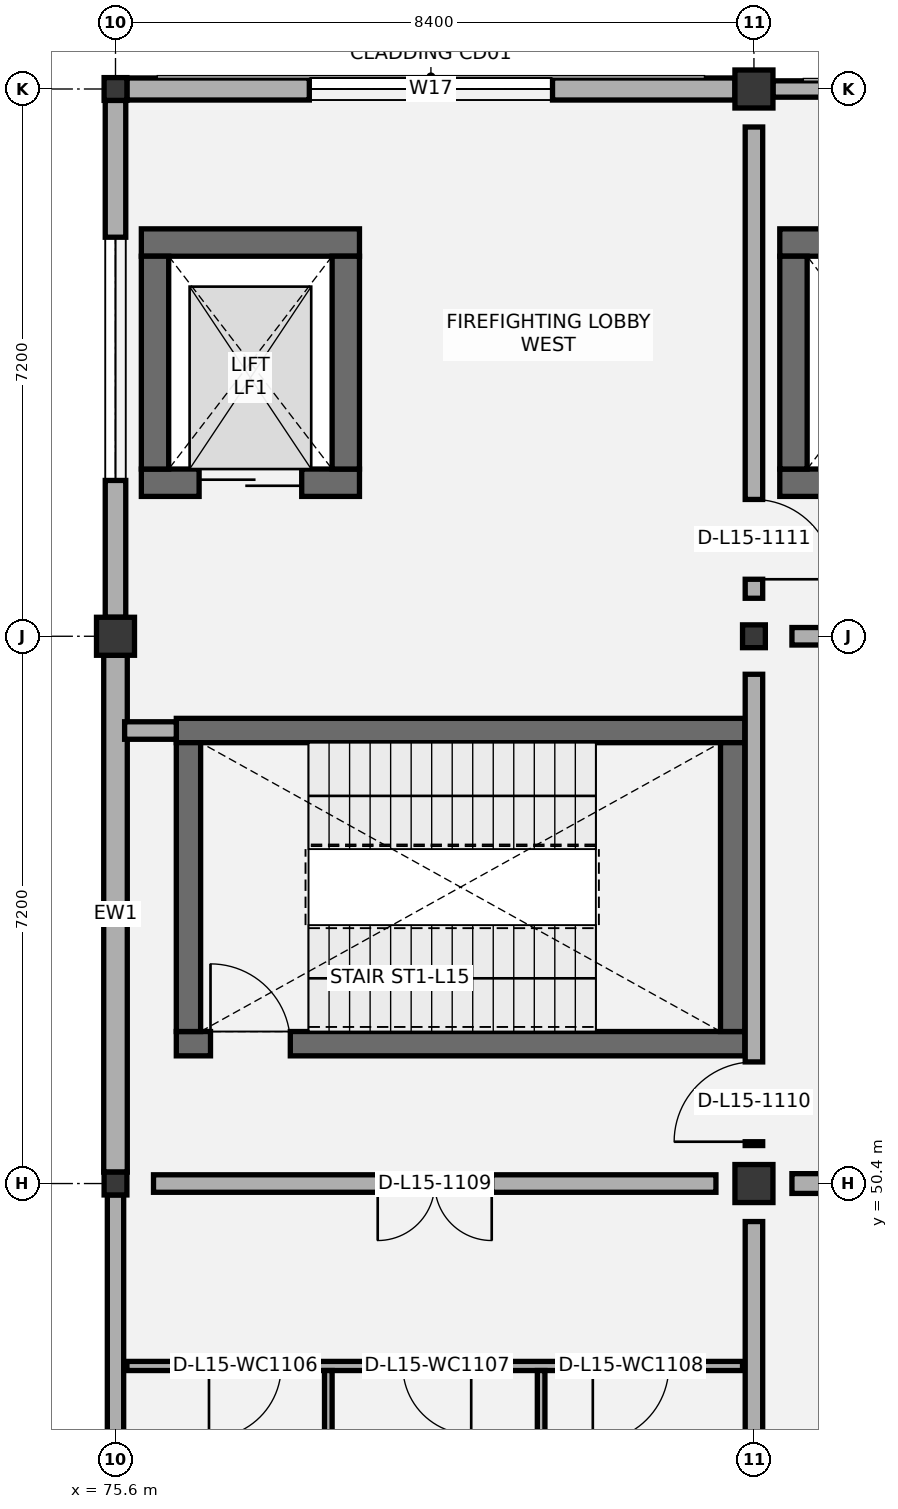
"""IFC4 building model, lengths in metres.
Left out: names, types, materials, properties, quantities, classifications, styles, units other than length and angle.
Written with IfcOpenShell. Run it as: python <this file> out.ifc"""

import sys

from ifc_helpers import new_model, si_unit, direction, frame, frame_2d, origin, origin_2d, place, context, subcontext, project, spatial, rectangle, i_section, extrude, element, fill, save


model = new_model("IFC4")
c1 = context("Model", 3, precision=1e-05, world=origin(), true_north=direction((0.0, 1.0)))
c2 = subcontext(c1, "Body", "Model", "MODEL_VIEW")
j1 = project(units=[si_unit("LENGTHUNIT", "METRE"), si_unit("PLANEANGLEUNIT", "RADIAN")], contexts=[c1])
p1 = place(None, origin())
s1 = spatial("IfcSite", under=j1, at=p1, CompositionType="ELEMENT")
p2 = place(p1, origin())
s2 = spatial("IfcBuilding", under=s1, at=p2, CompositionType="ELEMENT")
p3 = place(p2, frame((0.0, 0.0, 69.0)))
s3 = spatial("IfcBuildingStorey", under=s2, at=p3, CompositionType="ELEMENT", Elevation=69.0)
p4 = place(p3, frame((75.6, 50.4, 0.0), z_axis=(0.0, 0.0, 1.0), x_axis=(1.0, 0.0, 0.0)))
e1 = element("IfcColumn", 1, at=p4, inside=s3, PredefinedType="COLUMN", context=c2, shape_type="SweptSolid", body=[
    extrude(i_section(OverallWidth=0.3, OverallDepth=0.3, WebThickness=0.011, FlangeThickness=0.019, FilletRadius=0.027, at=origin_2d()), origin(), (0.0, 0.0, 1.0), 4.8),
])
p5 = place(p3, frame((75.6, 57.6, 0.0), z_axis=(0.0, 0.0, 1.0), x_axis=(1.0, 0.0, 0.0)))
e2 = element("IfcColumn", 2, at=p5, inside=s3, PredefinedType="COLUMN", context=c2, shape_type="SweptSolid", body=[
    extrude(rectangle(XDim=0.5, YDim=0.5, at=origin_2d()), origin(), (0.0, 0.0, 1.0), 4.8),
])
p6 = place(p3, frame((75.6, 64.8, 0.0), z_axis=(0.0, 0.0, 1.0), x_axis=(1.0, 0.0, 0.0)))
e3 = element("IfcColumn", 3, at=p6, inside=s3, PredefinedType="COLUMN", context=c2, shape_type="SweptSolid", body=[
    extrude(i_section(OverallWidth=0.3, OverallDepth=0.3, WebThickness=0.011, FlangeThickness=0.019, FilletRadius=0.027, at=origin_2d()), origin(), (0.0, 0.0, 1.0), 4.8),
])
p7 = place(p3, frame((84.0, 50.4, 0.0), z_axis=(0.0, 0.0, 1.0), x_axis=(1.0, 0.0, 0.0)))
e4 = element("IfcColumn", 4, at=p7, inside=s3, PredefinedType="COLUMN", context=c2, shape_type="SweptSolid", body=[
    extrude(rectangle(XDim=0.5, YDim=0.5, at=origin_2d()), origin(), (0.0, 0.0, 1.0), 4.8),
])
p8 = place(p3, frame((84.0, 57.6, 0.0), z_axis=(0.0, 0.0, 1.0), x_axis=(1.0, 0.0, 0.0)))
e5 = element("IfcColumn", 5, at=p8, inside=s3, PredefinedType="COLUMN", context=c2, shape_type="SweptSolid", body=[
    extrude(i_section(OverallWidth=0.3, OverallDepth=0.3, WebThickness=0.011, FlangeThickness=0.019, FilletRadius=0.027, at=origin_2d()), origin(), (0.0, 0.0, 1.0), 4.8),
])
p9 = place(p3, frame((84.0, 64.8, 0.0), z_axis=(0.0, 0.0, 1.0), x_axis=(1.0, 0.0, 0.0)))
e6 = element("IfcColumn", 6, at=p9, inside=s3, PredefinedType="COLUMN", context=c2, shape_type="SweptSolid", body=[
    extrude(rectangle(XDim=0.5, YDim=0.5, at=origin_2d()), origin(), (0.0, 0.0, 1.0), 4.8),
])
p10 = place(p3, frame((76.4, 52.24, 0.0), z_axis=(0.0, 0.0, 1.0), x_axis=(1.0, 0.0, 0.0)))
e7 = element("IfcWall", 7, at=p10, inside=s3, PredefinedType="SHEAR", context=c2, shape_type="SweptSolid", body=[
    extrude(rectangle(XDim=7.48, YDim=0.32, at=frame_2d((3.74, 0.0))), origin(), (0.0, 0.0, 1.0), 4.6),
])
p11 = place(p10, frame((0.45, 0.0, 0.0)))
e8 = element("IfcOpeningElement", 8, at=p11, cuts=e7, PredefinedType="OPENING", context=c2, shape_type="SweptSolid", body=[
    extrude(rectangle(XDim=1.05, YDim=2.15, at=frame_2d((0.525, 1.075))), frame((0.0, 0.17, 0.0), z_axis=(0.0, -1.0, 0.0), x_axis=(1.0, 0.0, 0.0)), (0.0, 0.0, 1.0), 0.34),
])
p12 = place(p3, frame((76.4, 56.36, 0.0), z_axis=(0.0, 0.0, 1.0), x_axis=(1.0, 0.0, 0.0)))
e9 = element("IfcWall", 9, at=p12, inside=s3, PredefinedType="SHEAR", context=c2, shape_type="SweptSolid", body=[
    extrude(rectangle(XDim=7.48, YDim=0.32, at=frame_2d((3.74, 0.0))), origin(), (0.0, 0.0, 1.0), 4.6),
])
for number, where, z_axis, x_axis in (
    (10, (76.56, 52.4, 0.0), (0.0, 0.0, 1.0), (0.0, 1.0, 0.0)),
    (11, (83.72, 52.4, 0.0), (0.0, 0.0, 1.0), (0.0, 1.0, 0.0)),
):
    element("IfcWall", number, at=place(p3, frame(where, z_axis=z_axis, x_axis=x_axis)), inside=s3, PredefinedType="SHEAR", context=c2, shape_type="SweptSolid", body=[
        extrude(rectangle(XDim=3.8, YDim=0.32, at=frame_2d((1.9, 0.0))), origin(), (0.0, 0.0, 1.0), 4.6),
    ])
p13 = place(p3, frame((75.94, 62.78, 0.0), z_axis=(0.0, 0.0, 1.0), x_axis=(1.0, 0.0, 0.0)))
e12 = element("IfcWall", 12, at=p13, inside=s3, PredefinedType="SHEAR", context=c2, shape_type="SweptSolid", body=[
    extrude(rectangle(XDim=2.87, YDim=0.36, at=frame_2d((1.435, 0.0))), origin(), (0.0, 0.0, 1.0), 5.9),
])
p14 = place(p3, frame((75.94, 59.62, 0.0), z_axis=(0.0, 0.0, 1.0), x_axis=(1.0, 0.0, 0.0)))
e13 = element("IfcWall", 13, at=p14, inside=s3, PredefinedType="SHEAR", context=c2, shape_type="SweptSolid", body=[
    extrude(rectangle(XDim=2.87, YDim=0.36, at=frame_2d((1.435, 0.0))), origin(), (0.0, 0.0, 1.0), 5.9),
])
p15 = place(p14, frame((0.76, 0.0, 0.0)))
e14 = element("IfcOpeningElement", 14, at=p15, cuts=e13, PredefinedType="OPENING", context=c2, shape_type="SweptSolid", body=[
    extrude(rectangle(XDim=1.35, YDim=2.2, at=frame_2d((0.675, 1.1))), frame((0.0, 0.19, 0.0), z_axis=(0.0, -1.0, 0.0), x_axis=(1.0, 0.0, 0.0)), (0.0, 0.0, 1.0), 0.38),
])
for number, where, z_axis, x_axis in (
    (15, (76.12, 59.8, 0.0), (0.0, 0.0, 1.0), (0.0, 1.0, 0.0)),
    (16, (78.63, 59.8, 0.0), (0.0, 0.0, 1.0), (0.0, 1.0, 0.0)),
):
    element("IfcWall", number, at=place(p3, frame(where, z_axis=z_axis, x_axis=x_axis)), inside=s3, PredefinedType="SHEAR", context=c2, shape_type="SweptSolid", body=[
        extrude(rectangle(XDim=2.8, YDim=0.36, at=frame_2d((1.4, 0.0))), origin(), (0.0, 0.0, 1.0), 5.9),
    ])
p16 = place(p3, frame((84.34, 62.78, 0.0), z_axis=(0.0, 0.0, 1.0), x_axis=(1.0, 0.0, 0.0)))
e17 = element("IfcWall", 17, at=p16, inside=s3, PredefinedType="SHEAR", context=c2, shape_type="SweptSolid", body=[
    extrude(rectangle(XDim=7.77, YDim=0.36, at=frame_2d((3.885, 0.0))), origin(), (0.0, 0.0, 1.0), 5.9),
])
p17 = place(p3, frame((84.34, 59.62, 0.0), z_axis=(0.0, 0.0, 1.0), x_axis=(1.0, 0.0, 0.0)))
e18 = element("IfcWall", 18, at=p17, inside=s3, PredefinedType="SHEAR", context=c2, shape_type="SweptSolid", body=[
    extrude(rectangle(XDim=2.66, YDim=0.36, at=frame_2d((1.33, 0.0))), origin(), (0.0, 0.0, 1.0), 5.9),
])
p18 = place(p17, frame((0.78, 0.0, 0.0)))
e19 = element("IfcOpeningElement", 19, at=p18, cuts=e18, PredefinedType="OPENING", context=c2, shape_type="SweptSolid", body=[
    extrude(rectangle(XDim=1.1, YDim=2.15, at=frame_2d((0.55, 1.075))), frame((0.0, 0.19, 0.0), z_axis=(0.0, -1.0, 0.0), x_axis=(1.0, 0.0, 0.0)), (0.0, 0.0, 1.0), 0.38),
])
p19 = place(p3, frame((84.52, 59.8, 0.0), z_axis=(0.0, 0.0, 1.0), x_axis=(0.0, 1.0, 0.0)))
e20 = element("IfcWall", 20, at=p19, inside=s3, PredefinedType="SHEAR", context=c2, shape_type="SweptSolid", body=[
    extrude(rectangle(XDim=2.8, YDim=0.36, at=frame_2d((1.4, 0.0))), origin(), (0.0, 0.0, 1.0), 5.9),
])
p20 = place(p3, frame((75.6, 43.45, 0.0), z_axis=(0.0, 0.0, 1.0), x_axis=(0.0, 1.0, 0.0)))
e21 = element("IfcWall", 21, at=p20, inside=s3, PredefinedType="SOLIDWALL", context=c2, shape_type="SweptSolid", body=[
    extrude(rectangle(XDim=6.8, YDim=0.215, at=frame_2d((3.4, 0.0))), origin(), (0.0, 0.0, 1.0), 4.045),
])
p21 = place(p3, frame((75.6, 50.55, 0.0), z_axis=(0.0, 0.0, 1.0), x_axis=(0.0, 1.0, 0.0)))
e22 = element("IfcWall", 22, at=p21, inside=s3, PredefinedType="SOLIDWALL", context=c2, shape_type="SweptSolid", body=[
    extrude(rectangle(XDim=6.8, YDim=0.31, at=frame_2d((3.4, 0.0))), origin(), (0.0, 0.0, 1.0), 4.045),
])
p22 = place(p3, frame((75.75, 64.8, 0.0), z_axis=(0.0, 0.0, 1.0), x_axis=(1.0, 0.0, 0.0)))
e23 = element("IfcWall", 23, at=p22, inside=s3, PredefinedType="SOLIDWALL", context=c2, shape_type="SweptSolid", body=[
    extrude(rectangle(XDim=8.0, YDim=0.29, at=frame_2d((4.0, 0.0))), origin(), (0.0, 0.0, 1.0), 4.365),
])
p23 = place(p22, frame((2.4, 0.0, 1.45)))
e24 = element("IfcOpeningElement", 24, at=p23, cuts=e23, PredefinedType="OPENING", context=c2, shape_type="SweptSolid", body=[
    extrude(rectangle(XDim=3.2, YDim=1.2, at=frame_2d((1.6, 0.6))), frame((0.0, 0.155, 0.0), z_axis=(0.0, -1.0, 0.0), x_axis=(1.0, 0.0, 0.0)), (0.0, 0.0, 1.0), 0.31),
])
p24 = place(p3, frame((75.6, 57.85, 0.0), z_axis=(0.0, 0.0, 1.0), x_axis=(0.0, 1.0, 0.0)))
e25 = element("IfcWall", 25, at=p24, inside=s3, PredefinedType="SOLIDWALL", context=c2, shape_type="SweptSolid", body=[
    extrude(rectangle(XDim=6.8, YDim=0.27, at=frame_2d((3.4, 0.0))), origin(), (0.0, 0.0, 1.0), 4.045),
])
p25 = place(p24, frame((1.8, 0.0, 1.45)))
e26 = element("IfcOpeningElement", 26, at=p25, cuts=e25, PredefinedType="OPENING", context=c2, shape_type="SweptSolid", body=[
    extrude(rectangle(XDim=3.2, YDim=1.2, at=frame_2d((1.6, 0.6))), frame((0.0, 0.145, 0.0), z_axis=(0.0, -1.0, 0.0), x_axis=(1.0, 0.0, 0.0)), (0.0, 0.0, 1.0), 0.29),
])
p26 = place(p3, frame((84.25, 64.8, 0.0), z_axis=(0.0, 0.0, 1.0), x_axis=(1.0, 0.0, 0.0)))
e27 = element("IfcWall", 27, at=p26, inside=s3, PredefinedType="SOLIDWALL", context=c2, shape_type="SweptSolid", body=[
    extrude(rectangle(XDim=8.0, YDim=0.215, at=frame_2d((4.0, 0.0))), origin(), (0.0, 0.0, 1.0), 4.365),
])
p27 = place(p26, frame((2.4, 0.0, 1.45)))
e28 = element("IfcOpeningElement", 28, at=p27, cuts=e27, PredefinedType="OPENING", context=c2, shape_type="SweptSolid", body=[
    extrude(rectangle(XDim=3.2, YDim=1.2, at=frame_2d((1.6, 0.6))), frame((0.0, 0.117, 0.0), z_axis=(0.0, -1.0, 0.0), x_axis=(1.0, 0.0, 0.0)), (0.0, 0.0, 1.0), 0.235),
])
p28 = place(p3, frame((75.75, 48.0, 0.0), z_axis=(0.0, 0.0, 1.0), x_axis=(1.0, 0.0, 0.0)))
e29 = element("IfcWall", 29, at=p28, inside=s3, PredefinedType="PARTITIONING", context=c2, shape_type="SweptSolid", body=[
    extrude(rectangle(XDim=8.1, YDim=0.12, at=frame_2d((4.05, 0.0))), origin(), (0.0, 0.0, 1.0), 4.6),
])
p29 = place(p28, frame((1.08, 0.0, 0.0)))
e30 = element("IfcOpeningElement", 30, at=p29, cuts=e29, PredefinedType="OPENING", context=c2, shape_type="SweptSolid", body=[
    extrude(rectangle(XDim=0.95, YDim=2.1, at=frame_2d((0.475, 1.05))), frame((0.0, 0.07, 0.0), z_axis=(0.0, -1.0, 0.0), x_axis=(1.0, 0.0, 0.0)), (0.0, 0.0, 1.0), 0.14),
])
p30 = place(p28, frame((3.63, 0.0, 0.0)))
e31 = element("IfcOpeningElement", 31, at=p30, cuts=e29, PredefinedType="OPENING", context=c2, shape_type="SweptSolid", body=[
    extrude(rectangle(XDim=0.9, YDim=2.1, at=frame_2d((0.45, 1.05))), frame((0.0, 0.07, 0.0), z_axis=(0.0, -1.0, 0.0), x_axis=(1.0, 0.0, 0.0)), (0.0, 0.0, 1.0), 0.14),
])
p31 = place(p28, frame((6.13, 0.0, 0.0)))
e32 = element("IfcOpeningElement", 32, at=p31, cuts=e29, PredefinedType="OPENING", context=c2, shape_type="SweptSolid", body=[
    extrude(rectangle(XDim=1.0, YDim=2.1, at=frame_2d((0.5, 1.05))), frame((0.0, 0.07, 0.0), z_axis=(0.0, -1.0, 0.0), x_axis=(1.0, 0.0, 0.0)), (0.0, 0.0, 1.0), 0.14),
])
for number, where, z_axis, x_axis in (
    (33, (78.4, 43.35, 0.0), (0.0, 0.0, 1.0), (0.0, 1.0, 0.0)),
    (34, (81.2, 43.35, 0.0), (0.0, 0.0, 1.0), (0.0, 1.0, 0.0)),
):
    element("IfcWall", number, at=place(p3, frame(where, z_axis=z_axis, x_axis=x_axis)), inside=s3, PredefinedType="PARTITIONING", context=c2, shape_type="SweptSolid", body=[
        extrude(rectangle(XDim=4.59, YDim=0.1, at=frame_2d((2.295, 0.0))), origin(), (0.0, 0.0, 1.0), 4.6),
    ])
p32 = place(p3, frame((84.0, 43.7, 0.0), z_axis=(0.0, 0.0, 1.0), x_axis=(0.0, 1.0, 0.0)))
e35 = element("IfcWall", 35, at=p32, inside=s3, PredefinedType="PARTITIONING", context=c2, shape_type="SweptSolid", body=[
    extrude(rectangle(XDim=6.2, YDim=0.23, at=frame_2d((3.1, 0.0))), origin(), (0.0, 0.0, 1.0), 4.095),
])
p33 = place(p3, frame((76.1, 50.4, 0.0), z_axis=(0.0, 0.0, 1.0), x_axis=(1.0, 0.0, 0.0)))
e36 = element("IfcWall", 36, at=p33, inside=s3, PredefinedType="PARTITIONING", context=c2, shape_type="SweptSolid", body=[
    extrude(rectangle(XDim=7.4, YDim=0.23, at=frame_2d((3.7, 0.0))), origin(), (0.0, 0.0, 1.0), 4.305),
])
p34 = place(p33, frame((2.95, 0.0, 0.0)))
e37 = element("IfcOpeningElement", 37, at=p34, cuts=e36, PredefinedType="OPENING", context=c2, shape_type="SweptSolid", body=[
    extrude(rectangle(XDim=1.5, YDim=2.15, at=frame_2d((0.75, 1.075))), frame((0.0, 0.125, 0.0), z_axis=(0.0, -1.0, 0.0), x_axis=(1.0, 0.0, 0.0)), (0.0, 0.0, 1.0), 0.25),
])
p35 = place(p3, frame((84.0, 50.9, 0.0), z_axis=(0.0, 0.0, 1.0), x_axis=(0.0, 1.0, 0.0)))
e38 = element("IfcWall", 38, at=p35, inside=s3, PredefinedType="PARTITIONING", context=c2, shape_type="SweptSolid", body=[
    extrude(rectangle(XDim=6.2, YDim=0.23, at=frame_2d((3.1, 0.0))), origin(), (0.0, 0.0, 1.0), 4.305),
])
p36 = place(p35, frame((0.05, 0.0, 0.0)))
e39 = element("IfcOpeningElement", 39, at=p36, cuts=e38, PredefinedType="OPENING", context=c2, shape_type="SweptSolid", body=[
    extrude(rectangle(XDim=1.05, YDim=2.15, at=frame_2d((0.525, 1.075))), frame((0.0, 0.125, 0.0), z_axis=(0.0, -1.0, 0.0), x_axis=(1.0, 0.0, 0.0)), (0.0, 0.0, 1.0), 0.25),
])
p37 = place(p3, frame((75.72, 56.36, 0.0), z_axis=(0.0, 0.0, 1.0), x_axis=(1.0, 0.0, 0.0)))
e40 = element("IfcWall", 40, at=p37, inside=s3, PredefinedType="PARTITIONING", context=c2, shape_type="SweptSolid", body=[
    extrude(rectangle(XDim=0.68, YDim=0.23, at=frame_2d((0.34, 0.0))), origin(), (0.0, 0.0, 1.0), 4.6),
])
p38 = place(p3, frame((84.0, 58.1, 0.0), z_axis=(0.0, 0.0, 1.0), x_axis=(0.0, 1.0, 0.0)))
e41 = element("IfcWall", 41, at=p38, inside=s3, PredefinedType="PARTITIONING", context=c2, shape_type="SweptSolid", body=[
    extrude(rectangle(XDim=6.2, YDim=0.23, at=frame_2d((3.1, 0.0))), origin(), (0.0, 0.0, 1.0), 4.095),
])
p39 = place(p38, frame((0.25, 0.0, 0.0)))
e42 = element("IfcOpeningElement", 42, at=p39, cuts=e41, PredefinedType="OPENING", context=c2, shape_type="SweptSolid", body=[
    extrude(rectangle(XDim=1.05, YDim=2.15, at=frame_2d((0.525, 1.075))), frame((0.0, 0.125, 0.0), z_axis=(0.0, -1.0, 0.0), x_axis=(1.0, 0.0, 0.0)), (0.0, 0.0, 1.0), 0.25),
])
p40 = place(p3, frame((84.5, 50.4, 0.0), z_axis=(0.0, 0.0, 1.0), x_axis=(1.0, 0.0, 0.0)))
e43 = element("IfcWall", 43, at=p40, inside=s3, PredefinedType="PARTITIONING", context=c2, shape_type="SweptSolid", body=[
    extrude(rectangle(XDim=7.4, YDim=0.26, at=frame_2d((3.7, 0.0))), origin(), (0.0, 0.0, 1.0), 4.325),
])
p41 = place(p40, frame((2.7, 0.0, 0.0)))
e44 = element("IfcOpeningElement", 44, at=p41, cuts=e43, PredefinedType="OPENING", context=c2, shape_type="SweptSolid", body=[
    extrude(rectangle(XDim=2.0, YDim=2.35, at=frame_2d((1.0, 1.175))), frame((0.0, 0.14, 0.0), z_axis=(0.0, -1.0, 0.0), x_axis=(1.0, 0.0, 0.0)), (0.0, 0.0, 1.0), 0.28),
])
p42 = place(p3, frame((84.5, 57.6, 0.0), z_axis=(0.0, 0.0, 1.0), x_axis=(1.0, 0.0, 0.0)))
e45 = element("IfcWall", 45, at=p42, inside=s3, PredefinedType="PARTITIONING", context=c2, shape_type="SweptSolid", body=[
    extrude(rectangle(XDim=7.4, YDim=0.23, at=frame_2d((3.7, 0.0))), origin(), (0.0, 0.0, 1.0), 4.325),
])
p43 = place(p42, frame((2.95, 0.0, 0.0)))
e46 = element("IfcOpeningElement", 46, at=p43, cuts=e45, PredefinedType="OPENING", context=c2, shape_type="SweptSolid", body=[
    extrude(rectangle(XDim=1.5, YDim=2.15, at=frame_2d((0.75, 1.075))), frame((0.0, 0.125, 0.0), z_axis=(0.0, -1.0, 0.0), x_axis=(1.0, 0.0, 0.0)), (0.0, 0.0, 1.0), 0.25),
])
p44 = place(p23, origin())
e47 = element("IfcWindow", 47, at=p44, inside=s3, PartitioningType="SINGLE_PANEL", PredefinedType="WINDOW", context=c2, shape_type="SweptSolid", body=[
    extrude(rectangle(XDim=3.2, YDim=1.2, at=frame_2d((1.6, 0.6))), frame((0.0, 0.03, 0.0), z_axis=(0.0, -1.0, 0.0), x_axis=(1.0, 0.0, 0.0)), (0.0, 0.0, 1.0), 0.06),
])
fill(e24, e47)
p45 = place(p25, origin())
e48 = element("IfcWindow", 48, at=p45, inside=s3, PartitioningType="SINGLE_PANEL", PredefinedType="WINDOW", context=c2, shape_type="SweptSolid", body=[
    extrude(rectangle(XDim=3.2, YDim=1.2, at=frame_2d((1.6, 0.6))), frame((0.0, 0.03, 0.0), z_axis=(0.0, -1.0, 0.0), x_axis=(1.0, 0.0, 0.0)), (0.0, 0.0, 1.0), 0.06),
])
fill(e26, e48)
p46 = place(p11, origin())
e49 = element("IfcDoor", 49, at=p46, inside=s3, OperationType="SINGLE_SWING_LEFT", PredefinedType="DOOR", context=c2, shape_type="SweptSolid", body=[
    extrude(rectangle(XDim=1.05, YDim=2.15, at=frame_2d((0.525, 1.075))), frame((0.0, 0.025, 0.0), z_axis=(0.0, -1.0, 0.0), x_axis=(1.0, 0.0, 0.0)), (0.0, 0.0, 1.0), 0.05),
])
fill(e8, e49)
p47 = place(p15, origin())
e50 = element("IfcDoor", 50, at=p47, inside=s3, OperationType="DOUBLE_DOOR_SLIDING", PredefinedType="DOOR", context=c2, shape_type="SweptSolid", body=[
    extrude(rectangle(XDim=1.35, YDim=2.2, at=frame_2d((0.675, 1.1))), frame((0.0, 0.025, 0.0), z_axis=(0.0, -1.0, 0.0), x_axis=(1.0, 0.0, 0.0)), (0.0, 0.0, 1.0), 0.05),
])
fill(e14, e50)
p48 = place(p29, frame((0.95, 0.0, 0.0), z_axis=(0.0, 0.0, 1.0), x_axis=(-1.0, 0.0, 0.0)))
e51 = element("IfcDoor", 51, at=p48, inside=s3, OperationType="SINGLE_SWING_RIGHT", PredefinedType="DOOR", context=c2, shape_type="SweptSolid", body=[
    extrude(rectangle(XDim=0.95, YDim=2.1, at=frame_2d((0.475, 1.05))), frame((0.0, 0.025, 0.0), z_axis=(0.0, -1.0, 0.0), x_axis=(1.0, 0.0, 0.0)), (0.0, 0.0, 1.0), 0.05),
])
fill(e30, e51)
p49 = place(p30, frame((0.9, 0.0, 0.0), z_axis=(0.0, 0.0, 1.0), x_axis=(-1.0, 0.0, 0.0)))
e52 = element("IfcDoor", 52, at=p49, inside=s3, OperationType="SINGLE_SWING_LEFT", PredefinedType="DOOR", context=c2, shape_type="SweptSolid", body=[
    extrude(rectangle(XDim=0.9, YDim=2.1, at=frame_2d((0.45, 1.05))), frame((0.0, 0.025, 0.0), z_axis=(0.0, -1.0, 0.0), x_axis=(1.0, 0.0, 0.0)), (0.0, 0.0, 1.0), 0.05),
])
fill(e31, e52)
p50 = place(p31, frame((1.0, 0.0, 0.0), z_axis=(0.0, 0.0, 1.0), x_axis=(-1.0, 0.0, 0.0)))
e53 = element("IfcDoor", 53, at=p50, inside=s3, OperationType="SINGLE_SWING_RIGHT", PredefinedType="DOOR", context=c2, shape_type="SweptSolid", body=[
    extrude(rectangle(XDim=1.0, YDim=2.1, at=frame_2d((0.5, 1.05))), frame((0.0, 0.025, 0.0), z_axis=(0.0, -1.0, 0.0), x_axis=(1.0, 0.0, 0.0)), (0.0, 0.0, 1.0), 0.05),
])
fill(e32, e53)
p51 = place(p34, frame((1.5, 0.0, 0.0), z_axis=(0.0, 0.0, 1.0), x_axis=(-1.0, 0.0, 0.0)))
e54 = element("IfcDoor", 54, at=p51, inside=s3, OperationType="DOUBLE_DOOR_SINGLE_SWING", PredefinedType="DOOR", context=c2, shape_type="SweptSolid", body=[
    extrude(rectangle(XDim=1.5, YDim=2.15, at=frame_2d((0.75, 1.075))), frame((0.0, 0.025, 0.0), z_axis=(0.0, -1.0, 0.0), x_axis=(1.0, 0.0, 0.0)), (0.0, 0.0, 1.0), 0.05),
])
fill(e37, e54)
p52 = place(p36, origin())
e55 = element("IfcDoor", 55, at=p52, inside=s3, OperationType="SINGLE_SWING_LEFT", PredefinedType="DOOR", context=c2, shape_type="SweptSolid", body=[
    extrude(rectangle(XDim=1.05, YDim=2.15, at=frame_2d((0.525, 1.075))), frame((0.0, 0.025, 0.0), z_axis=(0.0, -1.0, 0.0), x_axis=(1.0, 0.0, 0.0)), (0.0, 0.0, 1.0), 0.05),
])
fill(e39, e55)
p53 = place(p39, frame((1.05, 0.0, 0.0), z_axis=(0.0, 0.0, 1.0), x_axis=(-1.0, 0.0, 0.0)))
e56 = element("IfcDoor", 56, at=p53, inside=s3, OperationType="SINGLE_SWING_RIGHT", PredefinedType="DOOR", context=c2, shape_type="SweptSolid", body=[
    extrude(rectangle(XDim=1.05, YDim=2.15, at=frame_2d((0.525, 1.075))), frame((0.0, 0.025, 0.0), z_axis=(0.0, -1.0, 0.0), x_axis=(1.0, 0.0, 0.0)), (0.0, 0.0, 1.0), 0.05),
])
fill(e42, e56)
save(model, sys.argv[1])
